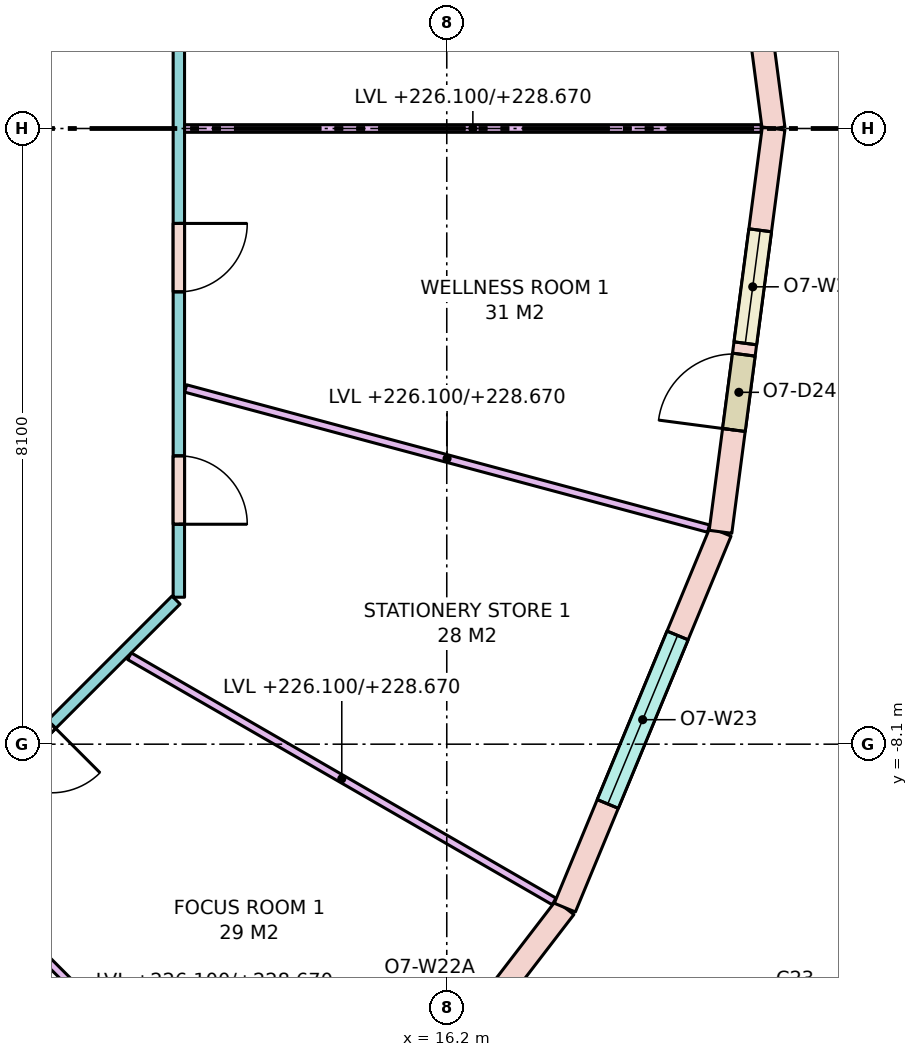
"""IFC4 building model, lengths in metres.
Left out: names, types, materials, properties, quantities, classifications, styles, units other than length and angle.
Written with IfcOpenShell. Run it as: python <this file> out.ifc"""

import sys

from ifc_helpers import new_model, si_unit, direction, frame, frame_2d, origin, place, context, subcontext, project, spatial, rectangle, extrude, element, fill, save


model = new_model("IFC4")
c1 = context("Model", 3, precision=1e-05, world=origin(), true_north=direction((0.0, 1.0)))
c2 = subcontext(c1, "Body", "Model", "MODEL_VIEW")
j1 = project(units=[si_unit("LENGTHUNIT", "METRE"), si_unit("PLANEANGLEUNIT", "RADIAN")], contexts=[c1])
p1 = place(None, origin())
s1 = spatial("IfcSite", under=j1, at=p1, CompositionType="ELEMENT")
p2 = place(p1, origin())
s2 = spatial("IfcBuilding", under=s1, at=p2, CompositionType="ELEMENT")
p3 = place(p2, frame((0.0, 0.0, 226.1)))
s3 = spatial("IfcBuildingStorey", under=s2, at=p3, CompositionType="ELEMENT", Elevation=226.1)
p4 = place(p3, frame((20.5, 0.0, 0.0), z_axis=(0.0, 0.0, 1.0), x_axis=(-0.130517056518, 0.991446064069, 0.0)))
e1 = element("IfcWall", 1, at=p4, inside=s3, PredefinedType="STANDARD", context=c2, shape_type="SweptSolid", body=[
    extrude(rectangle(XDim=5.352, YDim=0.3, at=frame_2d((2.676, 0.0))), origin(), (0.0, 0.0, 1.0), 3.42),
])
p5 = place(p4, frame((1.476, 0.0, 0.8)))
e2 = element("IfcOpeningElement", 2, at=p5, cuts=e1, PredefinedType="OPENING", context=c2, shape_type="SweptSolid", body=[
    extrude(rectangle(XDim=2.4, YDim=2.4, at=frame_2d((1.2, 1.2))), frame((0.0, 0.16, 0.0), z_axis=(0.0, -1.0, 0.0), x_axis=(1.0, 0.0, 0.0)), (0.0, 0.0, 1.0), 0.32),
])
p6 = place(p3, frame((14.496, -14.496, 0.0), z_axis=(0.0, 0.0, 1.0), x_axis=(0.60876670321, 0.793349293227, 0.0)))
e3 = element("IfcWall", 3, at=p6, inside=s3, PredefinedType="STANDARD", context=c2, shape_type="SweptSolid", body=[
    extrude(rectangle(XDim=5.352, YDim=0.3, at=frame_2d((2.676, 0.0))), origin(), (0.0, 0.0, 1.0), 3.42),
])
p7 = place(p6, frame((1.351, 0.0, 0.0)))
e4 = element("IfcOpeningElement", 4, at=p7, cuts=e3, PredefinedType="OPENING", context=c2, shape_type="SweptSolid", body=[
    extrude(rectangle(XDim=1.0, YDim=2.4, at=frame_2d((0.5, 1.2))), frame((0.0, 0.16, 0.0), z_axis=(0.0, -1.0, 0.0), x_axis=(1.0, 0.0, 0.0)), (0.0, 0.0, 1.0), 0.32),
])
p8 = place(p6, frame((2.501, 0.0, 0.8)))
e5 = element("IfcOpeningElement", 5, at=p8, cuts=e3, PredefinedType="OPENING", context=c2, shape_type="SweptSolid", body=[
    extrude(rectangle(XDim=1.5, YDim=2.4, at=frame_2d((0.75, 1.2))), frame((0.0, 0.16, 0.0), z_axis=(0.0, -1.0, 0.0), x_axis=(1.0, 0.0, 0.0)), (0.0, 0.0, 1.0), 0.32),
])
p9 = place(p3, frame((17.753, -10.25, 0.0), z_axis=(0.0, 0.0, 1.0), x_axis=(0.382713071139, 0.923867255172, 0.0)))
e6 = element("IfcWall", 6, at=p9, inside=s3, PredefinedType="STANDARD", context=c2, shape_type="SweptSolid", body=[
    extrude(rectangle(XDim=5.352, YDim=0.3, at=frame_2d((2.676, 0.0))), origin(), (0.0, 0.0, 1.0), 3.42),
])
p10 = place(p9, frame((1.476, 0.0, 0.8)))
e7 = element("IfcOpeningElement", 7, at=p10, cuts=e6, PredefinedType="OPENING", context=c2, shape_type="SweptSolid", body=[
    extrude(rectangle(XDim=2.4, YDim=2.4, at=frame_2d((1.2, 1.2))), frame((0.0, 0.16, 0.0), z_axis=(0.0, -1.0, 0.0), x_axis=(1.0, 0.0, 0.0)), (0.0, 0.0, 1.0), 0.32),
])
p11 = place(p3, frame((19.802, -5.306, 0.0), z_axis=(0.0, 0.0, 1.0), x_axis=(0.130517056518, 0.991446064069, 0.0)))
e8 = element("IfcWall", 8, at=p11, inside=s3, PredefinedType="STANDARD", context=c2, shape_type="SweptSolid", body=[
    extrude(rectangle(XDim=5.352, YDim=0.3, at=frame_2d((2.676, 0.0))), origin(), (0.0, 0.0, 1.0), 3.42),
])
p12 = place(p11, frame((1.351, 0.0, 0.0)))
e9 = element("IfcOpeningElement", 9, at=p12, cuts=e8, PredefinedType="OPENING", context=c2, shape_type="SweptSolid", body=[
    extrude(rectangle(XDim=1.0, YDim=2.4, at=frame_2d((0.5, 1.2))), frame((0.0, 0.16, 0.0), z_axis=(0.0, -1.0, 0.0), x_axis=(1.0, 0.0, 0.0)), (0.0, 0.0, 1.0), 0.32),
])
p13 = place(p11, frame((2.501, 0.0, 0.8)))
e10 = element("IfcOpeningElement", 10, at=p13, cuts=e8, PredefinedType="OPENING", context=c2, shape_type="SweptSolid", body=[
    extrude(rectangle(XDim=1.5, YDim=2.4, at=frame_2d((0.75, 1.2))), frame((0.0, 0.16, 0.0), z_axis=(0.0, -1.0, 0.0), x_axis=(1.0, 0.0, 0.0)), (0.0, 0.0, 1.0), 0.32),
])
p14 = place(p3, frame((12.638, -6.204, 0.0), z_axis=(0.0, 0.0, 1.0), x_axis=(-0.707106781187, -0.707106781187, 0.0)))
e11 = element("IfcWall", 11, at=p14, inside=s3, PredefinedType="PARTITIONING", context=c2, shape_type="SweptSolid", body=[
    extrude(rectangle(XDim=6.271, YDim=0.15, at=frame_2d((3.135, 0.0))), origin(), (0.0, 0.0, 1.0), 2.57),
])
p15 = place(p14, frame((4.935, 0.0, 0.0)))
e12 = element("IfcOpeningElement", 12, at=p15, cuts=e11, PredefinedType="OPENING", context=c2, shape_type="SweptSolid", body=[
    extrude(rectangle(XDim=0.9, YDim=2.1, at=frame_2d((0.45, 1.05))), frame((0.0, 0.085, 0.0), z_axis=(0.0, -1.0, 0.0), x_axis=(1.0, 0.0, 0.0)), (0.0, 0.0, 1.0), 0.17),
])
p16 = place(p14, frame((2.314, 0.0, 0.0)))
e13 = element("IfcOpeningElement", 13, at=p16, cuts=e11, PredefinedType="OPENING", context=c2, shape_type="SweptSolid", body=[
    extrude(rectangle(XDim=0.9, YDim=2.1, at=frame_2d((0.45, 1.05))), frame((0.0, 0.085, 0.0), z_axis=(0.0, -1.0, 0.0), x_axis=(1.0, 0.0, 0.0)), (0.0, 0.0, 1.0), 0.17),
])
p17 = place(p3, frame((12.675, 6.167, 0.0), z_axis=(0.0, 0.0, 1.0), x_axis=(0.0, -1.0, 0.0)))
e14 = element("IfcWall", 14, at=p17, inside=s3, PredefinedType="PARTITIONING", context=c2, shape_type="SweptSolid", body=[
    extrude(rectangle(XDim=12.333, YDim=0.15, at=frame_2d((6.167, 0.0))), origin(), (0.0, 0.0, 1.0), 2.57),
])
p18 = place(p17, frame((10.473, 0.0, 0.0)))
e15 = element("IfcOpeningElement", 15, at=p18, cuts=e14, PredefinedType="OPENING", context=c2, shape_type="SweptSolid", body=[
    extrude(rectangle(XDim=0.9, YDim=2.1, at=frame_2d((0.45, 1.05))), frame((0.0, 0.085, 0.0), z_axis=(0.0, -1.0, 0.0), x_axis=(1.0, 0.0, 0.0)), (0.0, 0.0, 1.0), 0.17),
])
p19 = place(p17, frame((7.416, 0.0, 0.0)))
e16 = element("IfcOpeningElement", 16, at=p19, cuts=e14, PredefinedType="OPENING", context=c2, shape_type="SweptSolid", body=[
    extrude(rectangle(XDim=0.9, YDim=2.1, at=frame_2d((0.45, 1.05))), frame((0.0, 0.085, 0.0), z_axis=(0.0, -1.0, 0.0), x_axis=(1.0, 0.0, 0.0)), (0.0, 0.0, 1.0), 0.17),
])
p20 = place(p17, frame((2.208, 0.0, 0.0)))
e17 = element("IfcOpeningElement", 17, at=p20, cuts=e14, PredefinedType="OPENING", context=c2, shape_type="SweptSolid", body=[
    extrude(rectangle(XDim=1.8, YDim=2.1, at=frame_2d((0.9, 1.05))), frame((0.0, 0.085, 0.0), z_axis=(0.0, -1.0, 0.0), x_axis=(1.0, 0.0, 0.0)), (0.0, 0.0, 1.0), 0.17),
])
p21 = place(p3, frame((12.75, 0.0, 0.0), z_axis=(0.0, 0.0, 1.0), x_axis=(1.0, 0.0, 0.0)))
e18 = element("IfcWall", 18, at=p21, inside=s3, PredefinedType="PARTITIONING", context=c2, shape_type="SweptSolid", body=[
    extrude(rectangle(XDim=7.587, YDim=0.1, at=frame_2d((3.793, 0.0))), origin(), (0.0, 0.0, 1.0), 2.57),
])
p22 = place(p3, frame((9.474, -9.474, 0.0), z_axis=(0.0, 0.0, 1.0), x_axis=(0.707106781187, -0.707106781187, 0.0)))
e19 = element("IfcWall", 19, at=p22, inside=s3, PredefinedType="PARTITIONING", context=c2, shape_type="SweptSolid", body=[
    extrude(rectangle(XDim=6.938, YDim=0.1, at=frame_2d((3.469, 0.0))), origin(), (0.0, 0.0, 1.0), 2.57),
])
p23 = place(p3, frame((12.025, -6.943, 0.0), z_axis=(0.0, 0.0, 1.0), x_axis=(0.866026773083, -0.499997628298, 0.0)))
e20 = element("IfcWall", 20, at=p23, inside=s3, PredefinedType="PARTITIONING", context=c2, shape_type="SweptSolid", body=[
    extrude(rectangle(XDim=6.451, YDim=0.1, at=frame_2d((3.226, 0.0))), origin(), (0.0, 0.0, 1.0), 2.57),
])
p24 = place(p3, frame((12.764, -3.42, 0.0), z_axis=(0.0, 0.0, 1.0), x_axis=(0.965928160208, -0.258810334643, 0.0)))
e21 = element("IfcWall", 21, at=p24, inside=s3, PredefinedType="PARTITIONING", context=c2, shape_type="SweptSolid", body=[
    extrude(rectangle(XDim=7.122, YDim=0.1, at=frame_2d((3.561, 0.0))), origin(), (0.0, 0.0, 1.0), 2.57),
])
p25 = place(p10, origin())
e22 = element("IfcWindow", 22, at=p25, inside=s3, PartitioningType="SINGLE_PANEL", PredefinedType="WINDOW", context=c2, shape_type="SweptSolid", body=[
    extrude(rectangle(XDim=2.4, YDim=2.4, at=frame_2d((1.2, 1.2))), frame((0.0, 0.03, 0.0), z_axis=(0.0, -1.0, 0.0), x_axis=(1.0, 0.0, 0.0)), (0.0, 0.0, 1.0), 0.06),
])
fill(e7, e22)
p26 = place(p12, origin())
e23 = element("IfcDoor", 23, at=p26, inside=s3, OperationType="SINGLE_SWING_LEFT", PredefinedType="DOOR", context=c2, shape_type="SweptSolid", body=[
    extrude(rectangle(XDim=1.0, YDim=2.4, at=frame_2d((0.5, 1.2))), frame((0.0, 0.025, 0.0), z_axis=(0.0, -1.0, 0.0), x_axis=(1.0, 0.0, 0.0)), (0.0, 0.0, 1.0), 0.05),
])
fill(e9, e23)
p27 = place(p13, origin())
e24 = element("IfcWindow", 24, at=p27, inside=s3, PartitioningType="SINGLE_PANEL", PredefinedType="WINDOW", context=c2, shape_type="SweptSolid", body=[
    extrude(rectangle(XDim=1.5, YDim=2.4, at=frame_2d((0.75, 1.2))), frame((0.0, 0.03, 0.0), z_axis=(0.0, -1.0, 0.0), x_axis=(1.0, 0.0, 0.0)), (0.0, 0.0, 1.0), 0.06),
])
fill(e10, e24)
p28 = place(p16, origin())
e25 = element("IfcDoor", 25, at=p28, inside=s3, OperationType="SINGLE_SWING_LEFT", PredefinedType="DOOR", context=c2, shape_type="SweptSolid", body=[
    extrude(rectangle(XDim=0.9, YDim=2.1, at=frame_2d((0.45, 1.05))), frame((0.0, 0.025, 0.0), z_axis=(0.0, -1.0, 0.0), x_axis=(1.0, 0.0, 0.0)), (0.0, 0.0, 1.0), 0.05),
])
fill(e13, e25)
p29 = place(p18, origin())
e26 = element("IfcDoor", 26, at=p29, inside=s3, OperationType="SINGLE_SWING_RIGHT", PredefinedType="DOOR", context=c2, shape_type="SweptSolid", body=[
    extrude(rectangle(XDim=0.9, YDim=2.1, at=frame_2d((0.45, 1.05))), frame((0.0, 0.025, 0.0), z_axis=(0.0, -1.0, 0.0), x_axis=(1.0, 0.0, 0.0)), (0.0, 0.0, 1.0), 0.05),
])
fill(e15, e26)
p30 = place(p19, origin())
e27 = element("IfcDoor", 27, at=p30, inside=s3, OperationType="SINGLE_SWING_LEFT", PredefinedType="DOOR", context=c2, shape_type="SweptSolid", body=[
    extrude(rectangle(XDim=0.9, YDim=2.1, at=frame_2d((0.45, 1.05))), frame((0.0, 0.025, 0.0), z_axis=(0.0, -1.0, 0.0), x_axis=(1.0, 0.0, 0.0)), (0.0, 0.0, 1.0), 0.05),
])
fill(e16, e27)
save(model, sys.argv[1])
